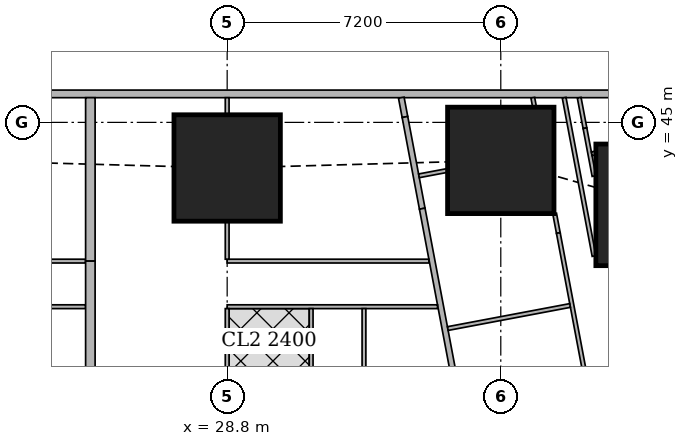
"""IFC4 building model, lengths in metres.
Left out: names, types, materials, properties, quantities, classifications, styles, units other than length and angle.
Written with IfcOpenShell. Run it as: python <this file> out.ifc"""

import sys

from ifc_helpers import new_model, si_unit, direction, frame, frame_2d, origin, origin_2d, place, context, subcontext, project, spatial, rectangle, extrude, element, fill, save


model = new_model("IFC4")
c1 = context("Model", 3, precision=1e-05, world=origin(), true_north=direction((0.0, 1.0)))
c2 = subcontext(c1, "Body", "Model", "MODEL_VIEW")
j1 = project(units=[si_unit("LENGTHUNIT", "METRE"), si_unit("PLANEANGLEUNIT", "RADIAN")], contexts=[c1])
p1 = place(None, origin())
s1 = spatial("IfcSite", under=j1, at=p1, CompositionType="ELEMENT")
p2 = place(p1, origin())
s2 = spatial("IfcBuilding", under=s1, at=p2, CompositionType="ELEMENT")
p3 = place(p2, frame((0.0, 0.0, 31.25)))
s3 = spatial("IfcBuildingStorey", under=s2, at=p3, CompositionType="ELEMENT", Elevation=31.25)
p4 = place(p3, frame((40.102, 42.83, 0.0), z_axis=(0.0, 0.0, 1.0), x_axis=(1.0, 0.0, 0.0)))
e1 = element("IfcColumn", 1, at=p4, inside=s3, PredefinedType="COLUMN", context=c2, shape_type="SweptSolid", body=[
    extrude(rectangle(XDim=3.2, YDim=3.2, at=origin_2d()), origin(), (0.0, 0.0, 1.0), 3.75),
])
for number, where, z_axis, x_axis in (
    (2, (28.8, 43.8, 0.0), (0.0, 0.0, 1.0), (1.0, 0.0, 0.0)),
    (3, (36.0, 44.0, 0.0), (0.0, 0.0, 1.0), (1.0, 0.0, 0.0)),
):
    element("IfcColumn", number, at=place(p3, frame(where, z_axis=z_axis, x_axis=x_axis)), inside=s3, PredefinedType="COLUMN", context=c2, shape_type="SweptSolid", body=[
        extrude(rectangle(XDim=2.8, YDim=2.8, at=origin_2d()), origin(), (0.0, 0.0, 1.0), 3.75),
    ])
p5 = place(p3, frame((40.106, 45.75, 0.0), z_axis=(0.0, 0.0, 1.0), x_axis=(-1.0, 0.0, 0.0)))
e4 = element("IfcWall", 4, at=p5, inside=s3, PredefinedType="SOLIDWALL", context=c2, shape_type="SweptSolid", body=[
    extrude(rectangle(XDim=37.943, YDim=0.2, at=frame_2d((18.971, 0.0))), origin(), (0.0, 0.0, 1.0), 3.5),
])
p6 = place(p5, frame((8.606, 0.0, 0.9)))
e5 = element("IfcOpeningElement", 5, at=p6, cuts=e4, PredefinedType="OPENING", context=c2, shape_type="SweptSolid", body=[
    extrude(rectangle(XDim=1.8, YDim=1.5, at=frame_2d((0.9, 0.75))), frame((0.0, 0.11, 0.0), z_axis=(0.0, -1.0, 0.0), x_axis=(1.0, 0.0, 0.0)), (0.0, 0.0, 1.0), 0.22),
])
p7 = place(p5, frame((12.206, 0.0, 0.9)))
e6 = element("IfcOpeningElement", 6, at=p7, cuts=e4, PredefinedType="OPENING", context=c2, shape_type="SweptSolid", body=[
    extrude(rectangle(XDim=1.8, YDim=1.5, at=frame_2d((0.9, 0.75))), frame((0.0, 0.11, 0.0), z_axis=(0.0, -1.0, 0.0), x_axis=(1.0, 0.0, 0.0)), (0.0, 0.0, 1.0), 0.22),
])
p8 = place(p5, frame((15.806, 0.0, 0.9)))
e7 = element("IfcOpeningElement", 7, at=p8, cuts=e4, PredefinedType="OPENING", context=c2, shape_type="SweptSolid", body=[
    extrude(rectangle(XDim=1.8, YDim=1.5, at=frame_2d((0.9, 0.75))), frame((0.0, 0.11, 0.0), z_axis=(0.0, -1.0, 0.0), x_axis=(1.0, 0.0, 0.0)), (0.0, 0.0, 1.0), 0.22),
])
p9 = place(p5, frame((19.406, 0.0, 0.9)))
e8 = element("IfcOpeningElement", 8, at=p9, cuts=e4, PredefinedType="OPENING", context=c2, shape_type="SweptSolid", body=[
    extrude(rectangle(XDim=1.8, YDim=1.5, at=frame_2d((0.9, 0.75))), frame((0.0, 0.11, 0.0), z_axis=(0.0, -1.0, 0.0), x_axis=(1.0, 0.0, 0.0)), (0.0, 0.0, 1.0), 0.22),
])
p10 = place(p5, frame((23.006, 0.0, 0.9)))
e9 = element("IfcOpeningElement", 9, at=p10, cuts=e4, PredefinedType="OPENING", context=c2, shape_type="SweptSolid", body=[
    extrude(rectangle(XDim=1.8, YDim=1.5, at=frame_2d((0.9, 0.75))), frame((0.0, 0.11, 0.0), z_axis=(0.0, -1.0, 0.0), x_axis=(1.0, 0.0, 0.0)), (0.0, 0.0, 1.0), 0.22),
])
p11 = place(p5, frame((26.606, 0.0, 0.9)))
e10 = element("IfcOpeningElement", 10, at=p11, cuts=e4, PredefinedType="OPENING", context=c2, shape_type="SweptSolid", body=[
    extrude(rectangle(XDim=1.8, YDim=1.5, at=frame_2d((0.9, 0.75))), frame((0.0, 0.11, 0.0), z_axis=(0.0, -1.0, 0.0), x_axis=(1.0, 0.0, 0.0)), (0.0, 0.0, 1.0), 0.22),
])
p12 = place(p3, frame((33.382, 45.65, 0.0), z_axis=(0.0, 0.0, 1.0), x_axis=(0.185657456326, -0.982614527122, 0.0)))
e11 = element("IfcWall", 11, at=p12, inside=s3, PredefinedType="SOLIDWALL", context=c2, shape_type="SweptSolid", body=[
    extrude(rectangle(XDim=0.517, YDim=0.15, at=frame_2d((0.258, 0.0))), origin(), (0.0, 0.0, 1.0), 3.5),
])
p13 = place(p3, frame((33.478, 45.142, 0.0), z_axis=(0.0, 0.0, 1.0), x_axis=(0.185393362436, -0.982664388876, 0.0)))
e12 = element("IfcWall", 12, at=p13, inside=s3, PredefinedType="SOLIDWALL", context=c2, shape_type="SweptSolid", body=[
    extrude(rectangle(XDim=2.455, YDim=0.15, at=frame_2d((1.227, 0.0))), origin(), (0.0, 0.0, 1.0), 2.05),
])
p14 = place(p3, frame((33.933, 42.73, 0.0), z_axis=(0.0, 0.0, 1.0), x_axis=(0.185617897238, -0.982622000682, 0.0)))
e13 = element("IfcWall", 13, at=p14, inside=s3, PredefinedType="SOLIDWALL", context=c2, shape_type="SweptSolid", body=[
    extrude(rectangle(XDim=5.887, YDim=0.15, at=frame_2d((2.944, 0.0))), origin(), (0.0, 0.0, 1.0), 3.5),
])
p15 = place(p3, frame((38.454, 41.483, 0.0), z_axis=(0.0, 0.0, 1.0), x_axis=(-0.185609245326, 0.982623634994, 0.0)))
e14 = element("IfcWall", 14, at=p15, inside=s3, PredefinedType="PARTITIONING", context=c2, shape_type="SweptSolid", body=[
    extrude(rectangle(XDim=4.241, YDim=0.1, at=frame_2d((2.12, 0.0))), origin(), (0.0, 0.0, 1.0), 2.05),
])
p16 = place(p3, frame((38.063, 45.65, 0.0), z_axis=(0.0, 0.0, 1.0), x_axis=(0.186109918919, -0.982528929895, 0.0)))
e15 = element("IfcWall", 15, at=p16, inside=s3, PredefinedType="PARTITIONING", context=c2, shape_type="SweptSolid", body=[
    extrude(rectangle(XDim=0.817, YDim=0.1, at=frame_2d((0.409, 0.0))), origin(), (0.0, 0.0, 1.0), 3.5),
])
p17 = place(p3, frame((38.215, 44.847, 0.0), z_axis=(0.0, 0.0, 1.0), x_axis=(0.185449486507, -0.982653798626, 0.0)))
e16 = element("IfcWall", 16, at=p17, inside=s3, PredefinedType="PARTITIONING", context=c2, shape_type="SweptSolid", body=[
    extrude(rectangle(XDim=1.282, YDim=0.1, at=frame_2d((0.641, 0.0))), origin(), (0.0, 0.0, 1.0), 2.05),
])
p18 = place(p3, frame((36.842, 45.65, 0.0), z_axis=(0.0, 0.0, 1.0), x_axis=(0.183986661451, -0.982928740249, 0.0)))
e17 = element("IfcWall", 17, at=p18, inside=s3, PredefinedType="PARTITIONING", context=c2, shape_type="SweptSolid", body=[
    extrude(rectangle(XDim=0.244, YDim=0.1, at=frame_2d((0.122, 0.0))), origin(), (0.0, 0.0, 1.0), 3.5),
])
p19 = place(p3, frame((37.417, 42.602, 0.0), z_axis=(0.0, 0.0, 1.0), x_axis=(0.185672001976, -0.982611778721, 0.0)))
e18 = element("IfcWall", 18, at=p19, inside=s3, PredefinedType="PARTITIONING", context=c2, shape_type="SweptSolid", body=[
    extrude(rectangle(XDim=0.522, YDim=0.1, at=frame_2d((0.261, 0.0))), origin(), (0.0, 0.0, 1.0), 2.05),
])
p20 = place(p3, frame((37.514, 42.089, 0.0), z_axis=(0.0, 0.0, 1.0), x_axis=(0.185543450498, -0.982636060796, 0.0)))
e19 = element("IfcWall", 19, at=p20, inside=s3, PredefinedType="PARTITIONING", context=c2, shape_type="SweptSolid", body=[
    extrude(rectangle(XDim=9.513, YDim=0.1, at=frame_2d((4.757, 0.0))), origin(), (0.0, 0.0, 1.0), 3.5),
])
p21 = place(p20, frame((8.008, 0.0, 0.0)))
e20 = element("IfcOpeningElement", 20, at=p21, cuts=e19, PredefinedType="OPENING", context=c2, shape_type="SweptSolid", body=[
    extrude(rectangle(XDim=0.9, YDim=2.1, at=frame_2d((0.45, 1.05))), frame((0.0, 0.06, 0.0), z_axis=(0.0, -1.0, 0.0), x_axis=(1.0, 0.0, 0.0)), (0.0, 0.0, 1.0), 0.12),
])
p22 = place(p20, frame((2.63, 0.0, 0.0)))
e21 = element("IfcOpeningElement", 21, at=p22, cuts=e19, PredefinedType="OPENING", context=c2, shape_type="SweptSolid", body=[
    extrude(rectangle(XDim=0.9, YDim=2.1, at=frame_2d((0.45, 1.05))), frame((0.0, 0.06, 0.0), z_axis=(0.0, -1.0, 0.0), x_axis=(1.0, 0.0, 0.0)), (0.0, 0.0, 1.0), 0.12),
])
p23 = place(p20, frame((5.341, 0.0, 0.0)))
e22 = element("IfcOpeningElement", 22, at=p23, cuts=e19, PredefinedType="OPENING", context=c2, shape_type="SweptSolid", body=[
    extrude(rectangle(XDim=0.9, YDim=2.1, at=frame_2d((0.45, 1.05))), frame((0.0, 0.06, 0.0), z_axis=(0.0, -1.0, 0.0), x_axis=(1.0, 0.0, 0.0)), (0.0, 0.0, 1.0), 0.12),
])
p24 = place(p3, frame((38.492, 44.193, 0.0), z_axis=(0.0, 0.0, 1.0), x_axis=(-0.981954528773, -0.189117168504, 0.0)))
e23 = element("IfcWall", 23, at=p24, inside=s3, PredefinedType="PARTITIONING", context=c2, shape_type="SweptSolid", body=[
    extrude(rectangle(XDim=0.101, YDim=0.1, at=frame_2d((0.05, 0.0))), origin(), (0.0, 0.0, 1.0), 2.05),
])
p25 = place(p3, frame((34.59, 43.734, 0.0), z_axis=(0.0, 0.0, 1.0), x_axis=(-0.98274036184, -0.184990219229, 0.0)))
e24 = element("IfcWall", 24, at=p25, inside=s3, PredefinedType="PARTITIONING", context=c2, shape_type="SweptSolid", body=[
    extrude(rectangle(XDim=0.756, YDim=0.1, at=frame_2d((0.378, 0.0))), origin(), (0.0, 0.0, 1.0), 2.05),
])
p26 = place(p3, frame((37.823, 40.182, 0.0), z_axis=(0.0, 0.0, 1.0), x_axis=(-0.982664729897, -0.18539155487, 0.0)))
e25 = element("IfcWall", 25, at=p26, inside=s3, PredefinedType="PARTITIONING", context=c2, shape_type="SweptSolid", body=[
    extrude(rectangle(XDim=3.274, YDim=0.1, at=frame_2d((1.637, 0.0))), origin(), (0.0, 0.0, 1.0), 3.5),
])
p27 = place(p3, frame((18.0, 41.35, 0.0), z_axis=(0.0, 0.0, 1.0), x_axis=(1.0, 0.0, 0.0)))
e26 = element("IfcWall", 26, at=p27, inside=s3, PredefinedType="PARTITIONING", context=c2, shape_type="SweptSolid", body=[
    extrude(rectangle(XDim=7.075, YDim=0.1, at=frame_2d((3.538, 0.0))), origin(), (0.0, 0.0, 1.0), 3.5),
])
p28 = place(p27, frame((0.2, 0.0, 0.0)))
e27 = element("IfcOpeningElement", 27, at=p28, cuts=e26, PredefinedType="OPENING", context=c2, shape_type="SweptSolid", body=[
    extrude(rectangle(XDim=0.9, YDim=2.1, at=frame_2d((0.45, 1.05))), frame((0.0, 0.06, 0.0), z_axis=(0.0, -1.0, 0.0), x_axis=(1.0, 0.0, 0.0)), (0.0, 0.0, 1.0), 0.12),
])
p29 = place(p27, frame((5.05, 0.0, 0.0)))
e28 = element("IfcOpeningElement", 28, at=p29, cuts=e26, PredefinedType="OPENING", context=c2, shape_type="SweptSolid", body=[
    extrude(rectangle(XDim=0.9, YDim=2.1, at=frame_2d((0.45, 1.05))), frame((0.0, 0.06, 0.0), z_axis=(0.0, -1.0, 0.0), x_axis=(1.0, 0.0, 0.0)), (0.0, 0.0, 1.0), 0.12),
])
p30 = place(p3, frame((18.0, 40.15, 0.0), z_axis=(0.0, 0.0, 1.0), x_axis=(1.0, 0.0, 0.0)))
e29 = element("IfcWall", 29, at=p30, inside=s3, PredefinedType="PARTITIONING", context=c2, shape_type="SweptSolid", body=[
    extrude(rectangle(XDim=7.075, YDim=0.1, at=frame_2d((3.538, 0.0))), origin(), (0.0, 0.0, 1.0), 3.5),
])
p31 = place(p30, frame((0.655, 0.0, 0.0)))
e30 = element("IfcOpeningElement", 30, at=p31, cuts=e29, PredefinedType="OPENING", context=c2, shape_type="SweptSolid", body=[
    extrude(rectangle(XDim=0.9, YDim=2.1, at=frame_2d((0.45, 1.05))), frame((0.0, 0.06, 0.0), z_axis=(0.0, -1.0, 0.0), x_axis=(1.0, 0.0, 0.0)), (0.0, 0.0, 1.0), 0.12),
])
p32 = place(p30, frame((3.95, 0.0, 0.0)))
e31 = element("IfcOpeningElement", 31, at=p32, cuts=e29, PredefinedType="OPENING", context=c2, shape_type="SweptSolid", body=[
    extrude(rectangle(XDim=0.9, YDim=2.1, at=frame_2d((0.45, 1.05))), frame((0.0, 0.06, 0.0), z_axis=(0.0, -1.0, 0.0), x_axis=(1.0, 0.0, 0.0)), (0.0, 0.0, 1.0), 0.12),
])
p33 = place(p30, frame((2.455, 0.0, 0.0)))
e32 = element("IfcOpeningElement", 32, at=p33, cuts=e29, PredefinedType="OPENING", context=c2, shape_type="SweptSolid", body=[
    extrude(rectangle(XDim=0.9, YDim=2.1, at=frame_2d((0.45, 1.05))), frame((0.0, 0.06, 0.0), z_axis=(0.0, -1.0, 0.0), x_axis=(1.0, 0.0, 0.0)), (0.0, 0.0, 1.0), 0.12),
])
p34 = place(p30, frame((5.75, 0.0, 0.0)))
e33 = element("IfcOpeningElement", 33, at=p34, cuts=e29, PredefinedType="OPENING", context=c2, shape_type="SweptSolid", body=[
    extrude(rectangle(XDim=0.9, YDim=2.1, at=frame_2d((0.45, 1.05))), frame((0.0, 0.06, 0.0), z_axis=(0.0, -1.0, 0.0), x_axis=(1.0, 0.0, 0.0)), (0.0, 0.0, 1.0), 0.12),
])
p35 = place(p3, frame((28.8, 41.35, 0.0), z_axis=(0.0, 0.0, 1.0), x_axis=(1.0, 0.0, 0.0)))
e34 = element("IfcWall", 34, at=p35, inside=s3, PredefinedType="PARTITIONING", context=c2, shape_type="SweptSolid", body=[
    extrude(rectangle(XDim=5.308, YDim=0.1, at=frame_2d((2.654, 0.0))), origin(), (0.0, 0.0, 1.0), 3.5),
])
p36 = place(p35, frame((1.45, 0.0, 0.0)))
e35 = element("IfcOpeningElement", 35, at=p36, cuts=e34, PredefinedType="OPENING", context=c2, shape_type="SweptSolid", body=[
    extrude(rectangle(XDim=0.9, YDim=2.1, at=frame_2d((0.45, 1.05))), frame((0.0, 0.06, 0.0), z_axis=(0.0, -1.0, 0.0), x_axis=(1.0, 0.0, 0.0)), (0.0, 0.0, 1.0), 0.12),
])
p37 = place(p3, frame((28.8, 40.15, 0.0), z_axis=(0.0, 0.0, 1.0), x_axis=(1.0, 0.0, 0.0)))
e36 = element("IfcWall", 36, at=p37, inside=s3, PredefinedType="PARTITIONING", context=c2, shape_type="SweptSolid", body=[
    extrude(rectangle(XDim=5.535, YDim=0.1, at=frame_2d((2.768, 0.0))), origin(), (0.0, 0.0, 1.0), 3.5),
])
p38 = place(p37, frame((0.655, 0.0, 0.0)))
e37 = element("IfcOpeningElement", 37, at=p38, cuts=e36, PredefinedType="OPENING", context=c2, shape_type="SweptSolid", body=[
    extrude(rectangle(XDim=0.9, YDim=2.1, at=frame_2d((0.45, 1.05))), frame((0.0, 0.06, 0.0), z_axis=(0.0, -1.0, 0.0), x_axis=(1.0, 0.0, 0.0)), (0.0, 0.0, 1.0), 0.12),
])
p39 = place(p37, frame((4.481, 0.0, 0.0)))
e38 = element("IfcOpeningElement", 38, at=p39, cuts=e36, PredefinedType="OPENING", context=c2, shape_type="SweptSolid", body=[
    extrude(rectangle(XDim=0.9, YDim=2.1, at=frame_2d((0.45, 1.05))), frame((0.0, 0.06, 0.0), z_axis=(0.0, -1.0, 0.0), x_axis=(1.0, 0.0, 0.0)), (0.0, 0.0, 1.0), 0.12),
])
p40 = place(p37, frame((2.455, 0.0, 0.0)))
e39 = element("IfcOpeningElement", 39, at=p40, cuts=e36, PredefinedType="OPENING", context=c2, shape_type="SweptSolid", body=[
    extrude(rectangle(XDim=0.9, YDim=2.1, at=frame_2d((0.45, 1.05))), frame((0.0, 0.06, 0.0), z_axis=(0.0, -1.0, 0.0), x_axis=(1.0, 0.0, 0.0)), (0.0, 0.0, 1.0), 0.12),
])
p41 = place(p3, frame((28.8, 41.4, 0.0), z_axis=(0.0, 0.0, 1.0), x_axis=(0.0, 1.0, 0.0)))
e40 = element("IfcWall", 40, at=p41, inside=s3, PredefinedType="PARTITIONING", context=c2, shape_type="SweptSolid", body=[
    extrude(rectangle(XDim=0.999, YDim=0.1, at=frame_2d((0.5, 0.0))), origin(), (0.0, 0.0, 1.0), 3.5),
])
p42 = place(p3, frame((28.8, 45.201, 0.0), z_axis=(0.0, 0.0, 1.0), x_axis=(0.0, 1.0, 0.0)))
e41 = element("IfcWall", 41, at=p42, inside=s3, PredefinedType="PARTITIONING", context=c2, shape_type="SweptSolid", body=[
    extrude(rectangle(XDim=0.449, YDim=0.1, at=frame_2d((0.225, 0.0))), origin(), (0.0, 0.0, 1.0), 3.5),
])
p43 = place(p3, frame((28.8, 38.401, 0.0), z_axis=(0.0, 0.0, 1.0), x_axis=(0.0, 1.0, 0.0)))
e42 = element("IfcWall", 42, at=p43, inside=s3, PredefinedType="PARTITIONING", context=c2, shape_type="SweptSolid", body=[
    extrude(rectangle(XDim=1.699, YDim=0.1, at=frame_2d((0.85, 0.0))), origin(), (0.0, 0.0, 1.0), 3.5),
])
for number, where, z_axis, x_axis in (
    (43, (32.4, 36.825, 0.0), (0.0, 0.0, 1.0), (0.0, 1.0, 0.0)),
    (44, (31.01, 36.825, 0.0), (0.0, 0.0, 1.0), (0.0, 1.0, 0.0)),
):
    element("IfcWall", number, at=place(p3, frame(where, z_axis=z_axis, x_axis=x_axis)), inside=s3, PredefinedType="PARTITIONING", context=c2, shape_type="SweptSolid", body=[
        extrude(rectangle(XDim=3.275, YDim=0.1, at=frame_2d((1.638, 0.0))), origin(), (0.0, 0.0, 1.0), 3.5),
    ])
p44 = place(p3, frame((25.2, 41.35, 0.0), z_axis=(0.0, 0.0, 1.0), x_axis=(0.0, 1.0, 0.0)))
e45 = element("IfcWall", 45, at=p44, inside=s3, PredefinedType="SOLIDWALL", context=c2, shape_type="SweptSolid", body=[
    extrude(rectangle(XDim=4.3, YDim=0.25, at=frame_2d((2.15, 0.0))), origin(), (0.0, 0.0, 1.0), 2.05),
])
p45 = place(p3, frame((25.2, 36.825, 0.0), z_axis=(0.0, 0.0, 1.0), x_axis=(0.0, 1.0, 0.0)))
e46 = element("IfcWall", 46, at=p45, inside=s3, PredefinedType="SOLIDWALL", context=c2, shape_type="SweptSolid", body=[
    extrude(rectangle(XDim=4.525, YDim=0.25, at=frame_2d((2.263, 0.0))), origin(), (0.0, 0.0, 1.0), 3.5),
])
p46 = place(p6, origin())
e47 = element("IfcWindow", 47, at=p46, inside=s3, PartitioningType="SINGLE_PANEL", PredefinedType="WINDOW", context=c2, shape_type="SweptSolid", body=[
    extrude(rectangle(XDim=1.8, YDim=1.5, at=frame_2d((0.9, 0.75))), frame((0.0, 0.03, 0.0), z_axis=(0.0, -1.0, 0.0), x_axis=(1.0, 0.0, 0.0)), (0.0, 0.0, 1.0), 0.06),
])
fill(e5, e47)
p47 = place(p7, origin())
e48 = element("IfcWindow", 48, at=p47, inside=s3, PartitioningType="SINGLE_PANEL", PredefinedType="WINDOW", context=c2, shape_type="SweptSolid", body=[
    extrude(rectangle(XDim=1.8, YDim=1.5, at=frame_2d((0.9, 0.75))), frame((0.0, 0.03, 0.0), z_axis=(0.0, -1.0, 0.0), x_axis=(1.0, 0.0, 0.0)), (0.0, 0.0, 1.0), 0.06),
])
fill(e6, e48)
p48 = place(p8, origin())
e49 = element("IfcWindow", 49, at=p48, inside=s3, PartitioningType="SINGLE_PANEL", PredefinedType="WINDOW", context=c2, shape_type="SweptSolid", body=[
    extrude(rectangle(XDim=1.8, YDim=1.5, at=frame_2d((0.9, 0.75))), frame((0.0, 0.03, 0.0), z_axis=(0.0, -1.0, 0.0), x_axis=(1.0, 0.0, 0.0)), (0.0, 0.0, 1.0), 0.06),
])
fill(e7, e49)
p49 = place(p22, origin())
e50 = element("IfcDoor", 50, at=p49, inside=s3, OperationType="SINGLE_SWING_LEFT", PredefinedType="DOOR", context=c2, shape_type="SweptSolid", body=[
    extrude(rectangle(XDim=0.9, YDim=2.1, at=frame_2d((0.45, 1.05))), frame((0.0, 0.025, 0.0), z_axis=(0.0, -1.0, 0.0), x_axis=(1.0, 0.0, 0.0)), (0.0, 0.0, 1.0), 0.05),
])
fill(e21, e50)
p50 = place(p34, origin())
e51 = element("IfcDoor", 51, at=p50, inside=s3, OperationType="SINGLE_SWING_LEFT", PredefinedType="DOOR", context=c2, shape_type="SweptSolid", body=[
    extrude(rectangle(XDim=0.9, YDim=2.1, at=frame_2d((0.45, 1.05))), frame((0.0, 0.025, 0.0), z_axis=(0.0, -1.0, 0.0), x_axis=(1.0, 0.0, 0.0)), (0.0, 0.0, 1.0), 0.05),
])
fill(e33, e51)
p51 = place(p36, origin())
e52 = element("IfcDoor", 52, at=p51, inside=s3, OperationType="SINGLE_SWING_RIGHT", PredefinedType="DOOR", context=c2, shape_type="SweptSolid", body=[
    extrude(rectangle(XDim=0.9, YDim=2.1, at=frame_2d((0.45, 1.05))), frame((0.0, 0.025, 0.0), z_axis=(0.0, -1.0, 0.0), x_axis=(1.0, 0.0, 0.0)), (0.0, 0.0, 1.0), 0.05),
])
fill(e35, e52)
p52 = place(p38, origin())
e53 = element("IfcDoor", 53, at=p52, inside=s3, OperationType="SINGLE_SWING_RIGHT", PredefinedType="DOOR", context=c2, shape_type="SweptSolid", body=[
    extrude(rectangle(XDim=0.9, YDim=2.1, at=frame_2d((0.45, 1.05))), frame((0.0, 0.025, 0.0), z_axis=(0.0, -1.0, 0.0), x_axis=(1.0, 0.0, 0.0)), (0.0, 0.0, 1.0), 0.05),
])
fill(e37, e53)
p53 = place(p39, origin())
e54 = element("IfcDoor", 54, at=p53, inside=s3, OperationType="SINGLE_SWING_LEFT", PredefinedType="DOOR", context=c2, shape_type="SweptSolid", body=[
    extrude(rectangle(XDim=0.9, YDim=2.1, at=frame_2d((0.45, 1.05))), frame((0.0, 0.025, 0.0), z_axis=(0.0, -1.0, 0.0), x_axis=(1.0, 0.0, 0.0)), (0.0, 0.0, 1.0), 0.05),
])
fill(e38, e54)
p54 = place(p40, origin())
e55 = element("IfcDoor", 55, at=p54, inside=s3, OperationType="SINGLE_SWING_RIGHT", PredefinedType="DOOR", context=c2, shape_type="SweptSolid", body=[
    extrude(rectangle(XDim=0.9, YDim=2.1, at=frame_2d((0.45, 1.05))), frame((0.0, 0.025, 0.0), z_axis=(0.0, -1.0, 0.0), x_axis=(1.0, 0.0, 0.0)), (0.0, 0.0, 1.0), 0.05),
])
fill(e39, e55)
save(model, sys.argv[1])
